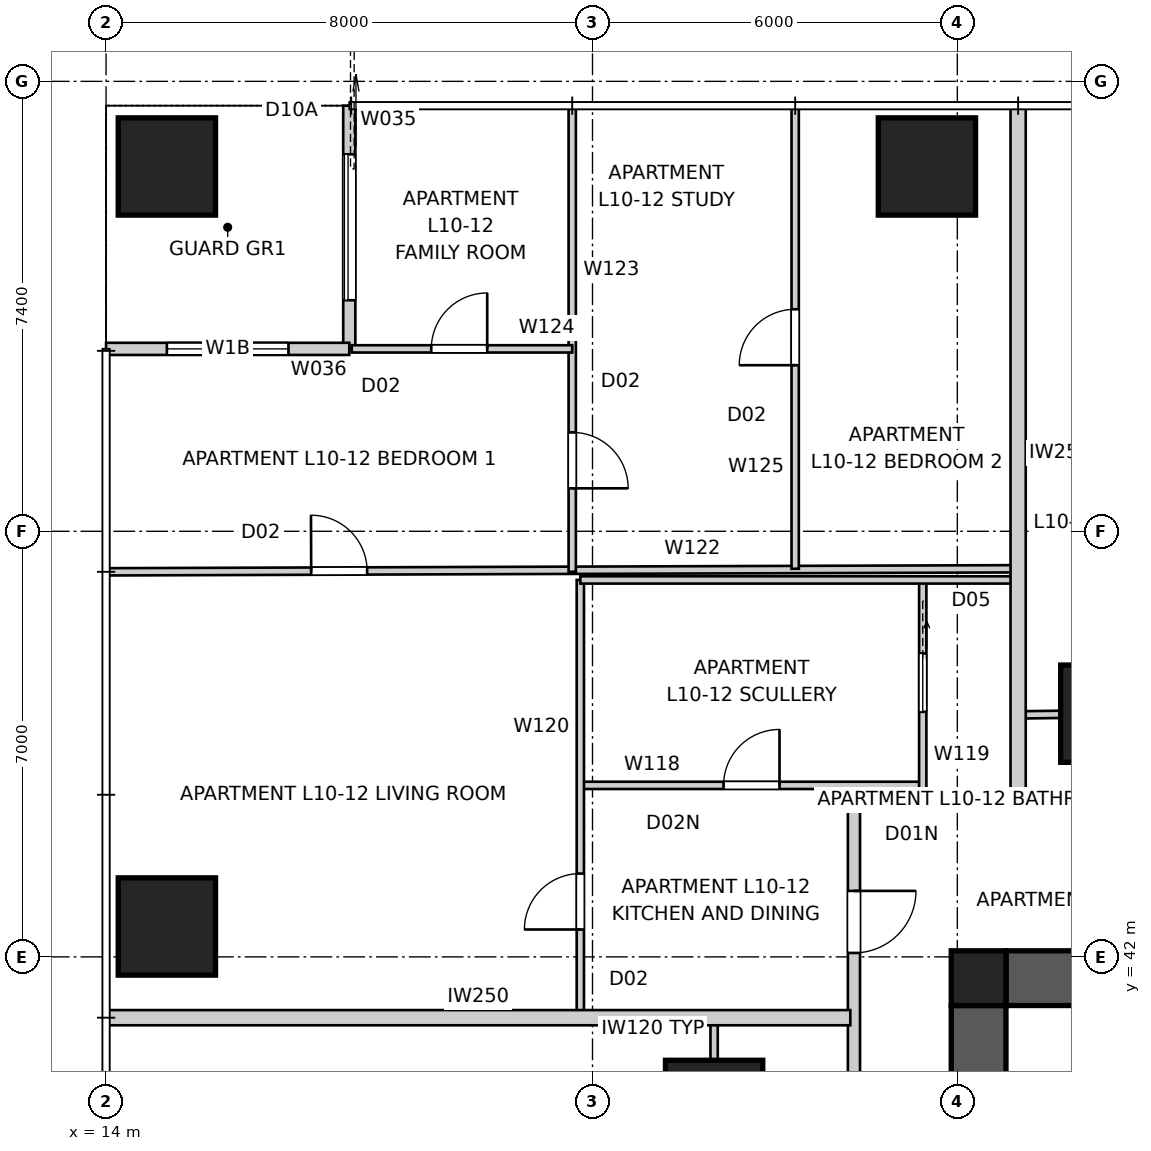
"""IFC4 building model, lengths in metres.
Left out: names, types, materials, properties, quantities, classifications, styles, units other than length and angle.
Written with IfcOpenShell. Run it as: python <this file> out.ifc"""

import sys

from ifc_helpers import new_model, si_unit, direction, frame, frame_2d, origin, origin_2d, place, context, subcontext, project, spatial, polyline, rectangle, outline, extrude, element, fill, save


model = new_model("IFC4")
c1 = context("Model", 3, precision=1e-05, world=origin(), true_north=direction((0.0, 1.0)))
c2 = subcontext(c1, "Body", "Model", "MODEL_VIEW")
j1 = project(units=[si_unit("LENGTHUNIT", "METRE"), si_unit("PLANEANGLEUNIT", "RADIAN")], contexts=[c1])
p1 = place(None, origin())
s1 = spatial("IfcSite", under=j1, at=p1, CompositionType="ELEMENT")
p2 = place(p1, origin())
s2 = spatial("IfcBuilding", under=s1, at=p2, CompositionType="ELEMENT")
p3 = place(p2, frame((0.0, 0.0, 38.8)))
s3 = spatial("IfcBuildingStorey", under=s2, at=p3, CompositionType="ELEMENT", Elevation=38.8)
p4 = place(p3, frame((28.8, 41.65, 0.0), z_axis=(0.0, 0.0, 1.0), x_axis=(1.0, 0.0, 0.0)))
e1 = element("IfcWall", 1, at=p4, inside=s3, PredefinedType="SHEAR", context=c2, shape_type="SweptSolid", body=[
    extrude(outline(polyline([(0.0, -0.45), (22.4, -0.45), (22.4, -0.025), (22.85, -0.025), (22.85, 0.025), (22.4, 0.025), (22.4, 0.45), (0.0, 0.45), (0.0, 0.025), (-0.45, 0.025), (-0.45, -0.025), (0.0, -0.025), (0.0, -0.45)])), origin(), (0.0, 0.0, 1.0), 3.4),
])
p5 = place(p3, frame((28.35, 41.2, 0.0), z_axis=(0.0, 0.0, 1.0), x_axis=(0.0, -1.0, 0.0)))
e2 = element("IfcWall", 2, at=p5, inside=s3, PredefinedType="SHEAR", context=c2, shape_type="SweptSolid", body=[
    extrude(outline(polyline([(0.0, -0.45), (22.4, -0.45), (22.4, -0.025), (22.85, -0.025), (22.85, 0.025), (22.4, 0.025), (22.4, 0.45), (0.0, 0.45), (0.0, 0.025), (-0.45, 0.025), (-0.45, -0.025), (0.0, -0.025), (0.0, -0.45)])), origin(), (0.0, 0.0, 1.0), 3.4),
])
p6 = place(p5, frame((11.14, 0.0, 0.0)))
e3 = element("IfcOpeningElement", 3, at=p6, cuts=e2, PredefinedType="OPENING", context=c2, shape_type="SweptSolid", body=[
    extrude(rectangle(XDim=1.02, YDim=2.4, at=frame_2d((0.51, 1.2))), frame((0.0, 0.46, 0.0), z_axis=(0.0, -1.0, 0.0), x_axis=(1.0, 0.0, 0.0)), (0.0, 0.0, 1.0), 0.92),
])
p7 = place(p3, frame((28.35, 41.65, 0.0), z_axis=(0.0, 0.0, 1.0), x_axis=(1.0, 0.0, 0.0)))
e4 = element("IfcColumn", 4, at=p7, inside=s3, PredefinedType="COLUMN", context=c2, shape_type="SweptSolid", body=[
    extrude(rectangle(XDim=0.9, YDim=0.9, at=origin_2d()), origin(), (0.0, 0.0, 1.0), 3.4),
])
for number, where, z_axis, x_axis in (
    (5, (27.5, 55.0, 0.0), (0.0, 0.0, 1.0), (1.0, 0.0, 0.0)),
    (6, (15.0, 55.0, 0.0), (0.0, 0.0, 1.0), (1.0, 0.0, 0.0)),
    (7, (15.0, 42.5, 0.0), (0.0, 0.0, 1.0), (1.0, 0.0, 0.0)),
):
    element("IfcColumn", number, at=place(p3, frame(where, z_axis=z_axis, x_axis=x_axis)), inside=s3, PredefinedType="COLUMN", context=c2, shape_type="SweptSolid", body=[
        extrude(rectangle(XDim=1.6, YDim=1.6, at=origin_2d()), origin(), (0.0, 0.0, 1.0), 3.2),
    ])
for number, where, z_axis, x_axis in (
    (8, (30.5, 46.0, 0.0), (0.0, 0.0, 1.0), (1.0, 0.0, 0.0)),
    (9, (24.0, 39.5, 0.0), (0.0, 0.0, 1.0), (1.0, 0.0, 0.0)),
):
    element("IfcColumn", number, at=place(p3, frame(where, z_axis=z_axis, x_axis=x_axis)), inside=s3, PredefinedType="COLUMN", context=c2, shape_type="SweptSolid", body=[
        extrude(rectangle(XDim=1.6, YDim=1.6, at=origin_2d()), origin(), (0.0, 0.0, 1.0), 3.4),
    ])
p8 = place(p3, frame((18.0, 56.0, 0.0), z_axis=(0.0, 0.0, 1.0), x_axis=(0.0, -1.0, 0.0)))
e10 = element("IfcWall", 10, at=p8, inside=s3, PredefinedType="SOLIDWALL", context=c2, shape_type="SweptSolid", body=[
    extrude(rectangle(XDim=4.0, YDim=0.2, at=frame_2d((2.0, 0.0))), origin(), (0.0, 0.0, 1.0), 3.2),
])
p9 = place(p8, frame((0.8, 0.0, 0.0)))
e11 = element("IfcOpeningElement", 11, at=p9, cuts=e10, PredefinedType="OPENING", context=c2, shape_type="SweptSolid", body=[
    extrude(rectangle(XDim=2.4, YDim=2.1, at=frame_2d((1.2, 1.05))), frame((0.0, 0.11, 0.0), z_axis=(0.0, -1.0, 0.0), x_axis=(1.0, 0.0, 0.0)), (0.0, 0.0, 1.0), 0.22),
])
p10 = place(p3, frame((18.0, 52.0, 0.0), z_axis=(0.0, 0.0, 1.0), x_axis=(-1.0, 0.0, 0.0)))
e12 = element("IfcWall", 12, at=p10, inside=s3, PredefinedType="SOLIDWALL", context=c2, shape_type="SweptSolid", body=[
    extrude(rectangle(XDim=4.0, YDim=0.2, at=frame_2d((2.0, 0.0))), origin(), (0.0, 0.0, 1.0), 3.2),
])
p11 = place(p10, frame((1.0, 0.0, 0.4)))
e13 = element("IfcOpeningElement", 13, at=p11, cuts=e12, PredefinedType="OPENING", context=c2, shape_type="SweptSolid", body=[
    extrude(rectangle(XDim=2.0, YDim=1.8, at=frame_2d((1.0, 0.9))), frame((0.0, 0.11, 0.0), z_axis=(0.0, -1.0, 0.0), x_axis=(1.0, 0.0, 0.0)), (0.0, 0.0, 1.0), 0.22),
])
p12 = place(p3, frame((54.5, 44.5, 0.0), z_axis=(0.0, 0.0, 1.0), x_axis=(-1.0, 0.0, 0.0)))
e14 = element("IfcWall", 14, at=p12, inside=s3, PredefinedType="PARTITIONING", context=c2, shape_type="SweptSolid", body=[
    extrude(rectangle(XDim=28.2, YDim=0.2, at=frame_2d((14.1, 0.0))), origin(), (0.0, 0.0, 1.0), 3.2),
])
p13 = place(p12, frame((19.853, 0.0, 0.0)))
e15 = element("IfcOpeningElement", 15, at=p13, cuts=e14, PredefinedType="OPENING", context=c2, shape_type="SweptSolid", body=[
    extrude(rectangle(XDim=1.02, YDim=2.34, at=frame_2d((0.51, 1.17))), frame((0.0, 0.11, 0.0), z_axis=(0.0, -1.0, 0.0), x_axis=(1.0, 0.0, 0.0)), (0.0, 0.0, 1.0), 0.22),
])
p14 = place(p12, frame((1.415, 0.0, 0.0)))
e16 = element("IfcOpeningElement", 16, at=p14, cuts=e14, PredefinedType="OPENING", context=c2, shape_type="SweptSolid", body=[
    extrude(rectangle(XDim=1.02, YDim=2.34, at=frame_2d((0.51, 1.17))), frame((0.0, 0.11, 0.0), z_axis=(0.0, -1.0, 0.0), x_axis=(1.0, 0.0, 0.0)), (0.0, 0.0, 1.0), 0.22),
])
p15 = place(p3, frame((26.3, 44.5, 0.0), z_axis=(0.0, 0.0, 1.0), x_axis=(0.0, -1.0, 0.0)))
e17 = element("IfcWall", 17, at=p15, inside=s3, PredefinedType="PARTITIONING", context=c2, shape_type="SweptSolid", body=[
    extrude(rectangle(XDim=28.2, YDim=0.2, at=frame_2d((14.1, 0.0))), origin(), (0.0, 0.0, 1.0), 3.2),
])
p16 = place(p15, frame((11.826, 0.0, 0.0)))
e18 = element("IfcOpeningElement", 18, at=p16, cuts=e17, PredefinedType="OPENING", context=c2, shape_type="SweptSolid", body=[
    extrude(rectangle(XDim=1.02, YDim=2.34, at=frame_2d((0.51, 1.17))), frame((0.0, 0.11, 0.0), z_axis=(0.0, -1.0, 0.0), x_axis=(1.0, 0.0, 0.0)), (0.0, 0.0, 1.0), 0.22),
])
p17 = place(p15, frame((16.048, 0.0, 0.0)))
e19 = element("IfcOpeningElement", 19, at=p17, cuts=e17, PredefinedType="OPENING", context=c2, shape_type="SweptSolid", body=[
    extrude(rectangle(XDim=1.02, YDim=2.34, at=frame_2d((0.51, 1.17))), frame((0.0, 0.11, 0.0), z_axis=(0.0, -1.0, 0.0), x_axis=(1.0, 0.0, 0.0)), (0.0, 0.0, 1.0), 0.22),
])
p18 = place(p15, frame((1.415, 0.0, 0.0)))
e20 = element("IfcOpeningElement", 20, at=p18, cuts=e17, PredefinedType="OPENING", context=c2, shape_type="SweptSolid", body=[
    extrude(rectangle(XDim=1.02, YDim=2.0, at=frame_2d((0.51, 1.0))), frame((0.0, 0.11, 0.0), z_axis=(0.0, -1.0, 0.0), x_axis=(1.0, 0.0, 0.0)), (0.0, 0.0, 1.0), 0.22),
])
p19 = place(p3, frame((29.0, 56.0, 0.0), z_axis=(0.0, 0.0, 1.0), x_axis=(0.0, -1.0, 0.0)))
e21 = element("IfcWall", 21, at=p19, inside=s3, PredefinedType="PARTITIONING", context=c2, shape_type="SweptSolid", body=[
    extrude(rectangle(XDim=11.44, YDim=0.25, at=frame_2d((5.72, 0.0))), origin(), (0.0, 0.0, 1.0), 3.2),
])
p20 = place(p3, frame((14.0, 41.0, 0.0), z_axis=(0.0, 0.0, 1.0), x_axis=(1.0, 0.0, 0.0)))
e22 = element("IfcWall", 22, at=p20, inside=s3, PredefinedType="PARTITIONING", context=c2, shape_type="SweptSolid", body=[
    extrude(rectangle(XDim=12.24, YDim=0.25, at=frame_2d((6.12, 0.0))), origin(), (0.0, 0.0, 1.0), 3.2),
])
p21 = place(p3, frame((29.0, 45.98, 0.0), z_axis=(0.0, 0.0, 1.0), x_axis=(0.999909565989, 0.013448414164, 0.0)))
e23 = element("IfcWall", 23, at=p21, inside=s3, PredefinedType="PARTITIONING", context=c2, shape_type="SweptSolid", body=[
    extrude(rectangle(XDim=3.667, YDim=0.12, at=frame_2d((1.833, 0.0))), origin(), (0.0, 0.0, 1.0), 2.2),
])
p22 = place(p3, frame((21.8, 44.821, 0.0), z_axis=(0.0, 0.0, 1.0), x_axis=(1.0, 0.0, 0.0)))
e24 = element("IfcWall", 24, at=p22, inside=s3, PredefinedType="PARTITIONING", context=c2, shape_type="SweptSolid", body=[
    extrude(rectangle(XDim=5.631, YDim=0.12, at=frame_2d((2.815, 0.0))), origin(), (0.0, 0.0, 1.0), 3.2),
])
p23 = place(p22, frame((2.355, 0.0, 0.0)))
e25 = element("IfcOpeningElement", 25, at=p23, cuts=e24, PredefinedType="OPENING", context=c2, shape_type="SweptSolid", body=[
    extrude(rectangle(XDim=0.92, YDim=2.0, at=frame_2d((0.46, 1.0))), frame((0.0, 0.07, 0.0), z_axis=(0.0, -1.0, 0.0), x_axis=(1.0, 0.0, 0.0)), (0.0, 0.0, 1.0), 0.14),
])
p24 = place(p3, frame((27.431, 48.2, 0.0), z_axis=(0.0, 0.0, 1.0), x_axis=(0.0, -1.0, 0.0)))
e26 = element("IfcWall", 26, at=p24, inside=s3, PredefinedType="PARTITIONING", context=c2, shape_type="SweptSolid", body=[
    extrude(rectangle(XDim=3.6, YDim=0.12, at=frame_2d((1.8, 0.0))), origin(), (0.0, 0.0, 1.0), 3.2),
])
p25 = place(p24, frame((1.209, 0.0, 0.0)))
e27 = element("IfcOpeningElement", 27, at=p25, cuts=e26, PredefinedType="OPENING", context=c2, shape_type="SweptSolid", body=[
    extrude(rectangle(XDim=0.96, YDim=2.1, at=frame_2d((0.48, 1.05))), frame((0.0, 0.07, 0.0), z_axis=(0.0, -1.0, 0.0), x_axis=(1.0, 0.0, 0.0)), (0.0, 0.0, 1.0), 0.14),
])
p26 = place(p3, frame((21.8, 41.0, 0.0), z_axis=(0.0, 0.0, 1.0), x_axis=(0.0, 1.0, 0.0)))
e28 = element("IfcWall", 28, at=p26, inside=s3, PredefinedType="PARTITIONING", context=c2, shape_type="SweptSolid", body=[
    extrude(rectangle(XDim=7.2, YDim=0.12, at=frame_2d((3.6, 0.0))), origin(), (0.0, 0.0, 1.0), 3.2),
])
p27 = place(p26, frame((1.45, 0.0, 0.0)))
e29 = element("IfcOpeningElement", 29, at=p27, cuts=e28, PredefinedType="OPENING", context=c2, shape_type="SweptSolid", body=[
    extrude(rectangle(XDim=0.92, YDim=2.34, at=frame_2d((0.46, 1.17))), frame((0.0, 0.07, 0.0), z_axis=(0.0, -1.0, 0.0), x_axis=(1.0, 0.0, 0.0)), (0.0, 0.0, 1.0), 0.14),
])
p28 = place(p3, frame((21.8, 48.2, 0.0), z_axis=(0.0, 0.0, 1.0), x_axis=(1.0, 0.0, 0.0)))
e30 = element("IfcWall", 30, at=p28, inside=s3, PredefinedType="PARTITIONING", context=c2, shape_type="SweptSolid", body=[
    extrude(rectangle(XDim=7.2, YDim=0.12, at=frame_2d((3.6, 0.0))), origin(), (0.0, 0.0, 1.0), 3.2),
])
p29 = place(p3, frame((14.04, 48.333, 0.0), z_axis=(0.0, 0.0, 1.0), x_axis=(0.9999944038, 0.003345499915, 0.0)))
e31 = element("IfcWall", 31, at=p29, inside=s3, PredefinedType="PARTITIONING", context=c2, shape_type="SweptSolid", body=[
    extrude(rectangle(XDim=14.96, YDim=0.12, at=frame_2d((7.48, 0.0))), origin(), (0.0, 0.0, 1.0), 3.2),
])
p30 = place(p29, frame((3.333, 0.0, 0.0)))
e32 = element("IfcOpeningElement", 32, at=p30, cuts=e31, PredefinedType="OPENING", context=c2, shape_type="SweptSolid", body=[
    extrude(rectangle(XDim=0.92, YDim=2.34, at=frame_2d((0.46, 1.17))), frame((0.0, 0.07, 0.0), z_axis=(0.0, -1.0, 0.0), x_axis=(1.0, 0.0, 0.0)), (0.0, 0.0, 1.0), 0.14),
])
p31 = place(p3, frame((21.667, 55.96, 0.0), z_axis=(0.0, 0.0, 1.0), x_axis=(0.0, -1.0, 0.0)))
e33 = element("IfcWall", 33, at=p31, inside=s3, PredefinedType="PARTITIONING", context=c2, shape_type="SweptSolid", body=[
    extrude(rectangle(XDim=7.627, YDim=0.12, at=frame_2d((3.813, 0.0))), origin(), (0.0, 0.0, 1.0), 3.2),
])
p32 = place(p31, frame((5.333, 0.0, 0.0)))
e34 = element("IfcOpeningElement", 34, at=p32, cuts=e33, PredefinedType="OPENING", context=c2, shape_type="SweptSolid", body=[
    extrude(rectangle(XDim=0.92, YDim=2.34, at=frame_2d((0.46, 1.17))), frame((0.0, 0.07, 0.0), z_axis=(0.0, -1.0, 0.0), x_axis=(1.0, 0.0, 0.0)), (0.0, 0.0, 1.0), 0.14),
])
p33 = place(p3, frame((18.04, 52.0, 0.0), z_axis=(0.0, 0.0, 1.0), x_axis=(1.0, 0.0, 0.0)))
e35 = element("IfcWall", 35, at=p33, inside=s3, PredefinedType="PARTITIONING", context=c2, shape_type="SweptSolid", body=[
    extrude(rectangle(XDim=3.627, YDim=0.12, at=frame_2d((1.813, 0.0))), origin(), (0.0, 0.0, 1.0), 3.2),
])
p34 = place(p33, frame((1.308, 0.0, 0.0)))
e36 = element("IfcOpeningElement", 36, at=p34, cuts=e35, PredefinedType="OPENING", context=c2, shape_type="SweptSolid", body=[
    extrude(rectangle(XDim=0.92, YDim=2.34, at=frame_2d((0.46, 1.17))), frame((0.0, 0.07, 0.0), z_axis=(0.0, -1.0, 0.0), x_axis=(1.0, 0.0, 0.0)), (0.0, 0.0, 1.0), 0.14),
])
p35 = place(p3, frame((25.333, 48.383, 0.0), z_axis=(0.0, 0.0, 1.0), x_axis=(0.0, 1.0, 0.0)))
e37 = element("IfcWall", 37, at=p35, inside=s3, PredefinedType="PARTITIONING", context=c2, shape_type="SweptSolid", body=[
    extrude(rectangle(XDim=7.577, YDim=0.12, at=frame_2d((3.788, 0.0))), origin(), (0.0, 0.0, 1.0), 2.4),
])
p36 = place(p35, frame((3.348, 0.0, 0.0)))
e38 = element("IfcOpeningElement", 38, at=p36, cuts=e37, PredefinedType="OPENING", context=c2, shape_type="SweptSolid", body=[
    extrude(rectangle(XDim=0.92, YDim=2.34, at=frame_2d((0.46, 1.17))), frame((0.0, 0.07, 0.0), z_axis=(0.0, -1.0, 0.0), x_axis=(1.0, 0.0, 0.0)), (0.0, 0.0, 1.0), 0.14),
])
p37 = place(p3, frame((24.0, 37.333, 0.0), z_axis=(0.0, 0.0, 1.0), x_axis=(0.0, 1.0, 0.0)))
e39 = element("IfcWall", 39, at=p37, inside=s3, PredefinedType="PARTITIONING", context=c2, shape_type="SweptSolid", body=[
    extrude(rectangle(XDim=3.667, YDim=0.12, at=frame_2d((1.833, 0.0))), origin(), (0.0, 0.0, 1.0), 2.2),
])
p38 = place(p9, origin())
e40 = element("IfcDoor", 40, at=p38, inside=s3, OperationType="SLIDING_TO_LEFT", PredefinedType="DOOR", context=c2, shape_type="SweptSolid", body=[
    extrude(rectangle(XDim=2.4, YDim=2.1, at=frame_2d((1.2, 1.05))), frame((0.0, 0.025, 0.0), z_axis=(0.0, -1.0, 0.0), x_axis=(1.0, 0.0, 0.0)), (0.0, 0.0, 1.0), 0.05),
])
fill(e11, e40)
p39 = place(p11, origin())
e41 = element("IfcWindow", 41, at=p39, inside=s3, PartitioningType="SINGLE_PANEL", PredefinedType="WINDOW", context=c2, shape_type="SweptSolid", body=[
    extrude(rectangle(XDim=2.0, YDim=1.8, at=frame_2d((1.0, 0.9))), frame((0.0, 0.03, 0.0), z_axis=(0.0, -1.0, 0.0), x_axis=(1.0, 0.0, 0.0)), (0.0, 0.0, 1.0), 0.06),
])
fill(e13, e41)
p40 = place(p18, origin())
e42 = element("IfcDoor", 42, at=p40, inside=s3, OperationType="SINGLE_SWING_LEFT", PredefinedType="DOOR", context=c2, shape_type="SweptSolid", body=[
    extrude(rectangle(XDim=1.02, YDim=2.0, at=frame_2d((0.51, 1.0))), frame((0.0, 0.025, 0.0), z_axis=(0.0, -1.0, 0.0), x_axis=(1.0, 0.0, 0.0)), (0.0, 0.0, 1.0), 0.05),
])
fill(e20, e42)
p41 = place(p23, origin())
e43 = element("IfcDoor", 43, at=p41, inside=s3, OperationType="SINGLE_SWING_RIGHT", PredefinedType="DOOR", context=c2, shape_type="SweptSolid", body=[
    extrude(rectangle(XDim=0.92, YDim=2.0, at=frame_2d((0.46, 1.0))), frame((0.0, 0.025, 0.0), z_axis=(0.0, -1.0, 0.0), x_axis=(1.0, 0.0, 0.0)), (0.0, 0.0, 1.0), 0.05),
])
fill(e25, e43)
p42 = place(p27, origin())
e44 = element("IfcDoor", 44, at=p42, inside=s3, OperationType="SINGLE_SWING_LEFT", PredefinedType="DOOR", context=c2, shape_type="SweptSolid", body=[
    extrude(rectangle(XDim=0.92, YDim=2.34, at=frame_2d((0.46, 1.17))), frame((0.0, 0.025, 0.0), z_axis=(0.0, -1.0, 0.0), x_axis=(1.0, 0.0, 0.0)), (0.0, 0.0, 1.0), 0.05),
])
fill(e29, e44)
p43 = place(p25, origin())
e45 = element("IfcDoor", 45, at=p43, inside=s3, OperationType="SLIDING_TO_LEFT", PredefinedType="DOOR", context=c2, shape_type="SweptSolid", body=[
    extrude(rectangle(XDim=0.96, YDim=2.1, at=frame_2d((0.48, 1.05))), frame((0.0, 0.025, 0.0), z_axis=(0.0, -1.0, 0.0), x_axis=(1.0, 0.0, 0.0)), (0.0, 0.0, 1.0), 0.05),
])
fill(e27, e45)
p44 = place(p30, origin())
e46 = element("IfcDoor", 46, at=p44, inside=s3, OperationType="SINGLE_SWING_LEFT", PredefinedType="DOOR", context=c2, shape_type="SweptSolid", body=[
    extrude(rectangle(XDim=0.92, YDim=2.34, at=frame_2d((0.46, 1.17))), frame((0.0, 0.025, 0.0), z_axis=(0.0, -1.0, 0.0), x_axis=(1.0, 0.0, 0.0)), (0.0, 0.0, 1.0), 0.05),
])
fill(e32, e46)
p45 = place(p34, origin())
e47 = element("IfcDoor", 47, at=p45, inside=s3, OperationType="SINGLE_SWING_RIGHT", PredefinedType="DOOR", context=c2, shape_type="SweptSolid", body=[
    extrude(rectangle(XDim=0.92, YDim=2.34, at=frame_2d((0.46, 1.17))), frame((0.0, 0.025, 0.0), z_axis=(0.0, -1.0, 0.0), x_axis=(1.0, 0.0, 0.0)), (0.0, 0.0, 1.0), 0.05),
])
fill(e36, e47)
p46 = place(p32, origin())
e48 = element("IfcDoor", 48, at=p46, inside=s3, OperationType="SINGLE_SWING_RIGHT", PredefinedType="DOOR", context=c2, shape_type="SweptSolid", body=[
    extrude(rectangle(XDim=0.92, YDim=2.34, at=frame_2d((0.46, 1.17))), frame((0.0, 0.025, 0.0), z_axis=(0.0, -1.0, 0.0), x_axis=(1.0, 0.0, 0.0)), (0.0, 0.0, 1.0), 0.05),
])
fill(e34, e48)
p47 = place(p36, origin())
e49 = element("IfcDoor", 49, at=p47, inside=s3, OperationType="SINGLE_SWING_LEFT", PredefinedType="DOOR", context=c2, shape_type="SweptSolid", body=[
    extrude(rectangle(XDim=0.92, YDim=2.34, at=frame_2d((0.46, 1.17))), frame((0.0, 0.025, 0.0), z_axis=(0.0, -1.0, 0.0), x_axis=(1.0, 0.0, 0.0)), (0.0, 0.0, 1.0), 0.05),
])
fill(e38, e49)
save(model, sys.argv[1])
